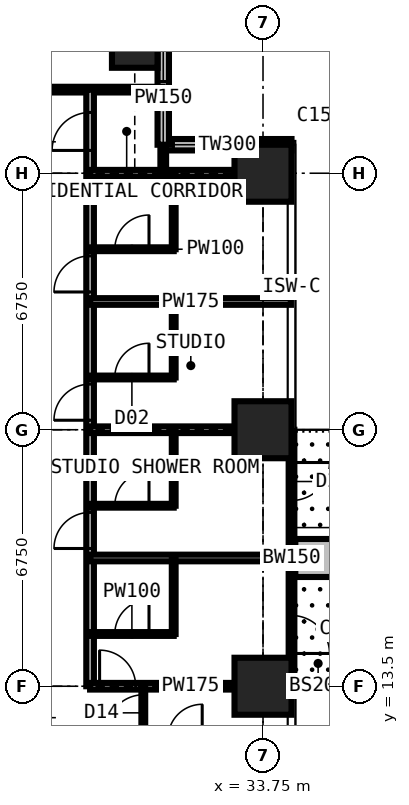
"""IFC4 building model, lengths in metres.
Left out: names, types, materials, properties, quantities, classifications, styles, units other than length and angle.
Written with IfcOpenShell. Run it as: python <this file> out.ifc"""

import sys

from ifc_helpers import new_model, si_unit, direction, frame, frame_2d, origin, origin_2d, place, context, subcontext, project, spatial, rectangle, extrude, element, fill, save


model = new_model("IFC4")
c1 = context("Model", 3, precision=1e-05, world=origin(), true_north=direction((0.0, 1.0)))
c2 = subcontext(c1, "Body", "Model", "MODEL_VIEW")
j1 = project(units=[si_unit("LENGTHUNIT", "METRE"), si_unit("PLANEANGLEUNIT", "RADIAN")], contexts=[c1])
p1 = place(None, origin())
s1 = spatial("IfcSite", under=j1, at=p1, CompositionType="ELEMENT")
p2 = place(p1, origin())
s2 = spatial("IfcBuilding", under=s1, at=p2, CompositionType="ELEMENT")
p3 = place(p2, frame((0.0, 0.0, 156.6)))
s3 = spatial("IfcBuildingStorey", under=s2, at=p3, CompositionType="ELEMENT", Elevation=156.6)
p4 = place(p3, frame((30.375, 30.375, 0.0), z_axis=(0.0, 0.0, 1.0), x_axis=(1.0, 0.0, 0.0)))
e1 = element("IfcColumn", 1, at=p4, inside=s3, PredefinedType="COLUMN", context=c2, shape_type="SweptSolid", body=[
    extrude(rectangle(XDim=1.2, YDim=1.2, at=origin_2d()), origin(), (0.0, 0.0, 1.0), 3.6),
])
for number, where, z_axis, x_axis in (
    (2, (33.75, 13.5, 0.0), (0.0, 0.0, 1.0), (1.0, 0.0, 0.0)),
    (3, (33.75, 20.25, 0.0), (0.0, 0.0, 1.0), (1.0, 0.0, 0.0)),
    (4, (33.75, 27.0, 0.0), (0.0, 0.0, 1.0), (1.0, 0.0, 0.0)),
):
    element("IfcColumn", number, at=place(p3, frame(where, z_axis=z_axis, x_axis=x_axis)), inside=s3, PredefinedType="COLUMN", context=c2, shape_type="SweptSolid", body=[
        extrude(rectangle(XDim=1.5, YDim=1.5, at=origin_2d()), origin(), (0.0, 0.0, 1.0), 3.6),
    ])
p5 = place(p3, frame((34.5, 20.25, 0.0), z_axis=(0.0, 0.0, 1.0), x_axis=(0.0, -1.0, 0.0)))
e5 = element("IfcWall", 5, at=p5, inside=s3, PredefinedType="SOLIDWALL", context=c2, shape_type="SweptSolid", body=[
    extrude(rectangle(XDim=6.75, YDim=0.15, at=frame_2d((3.375, 0.0))), origin(), (0.0, 0.0, 1.0), 3.375),
])
p6 = place(p5, frame((0.863, 0.0, 0.0)))
e6 = element("IfcOpeningElement", 6, at=p6, cuts=e5, PredefinedType="OPENING", context=c2, shape_type="SweptSolid", body=[
    extrude(rectangle(XDim=1.0, YDim=2.2, at=frame_2d((0.5, 1.1))), frame((0.0, 0.085, 0.0), z_axis=(0.0, -1.0, 0.0), x_axis=(1.0, 0.0, 0.0)), (0.0, 0.0, 1.0), 0.17),
])
p7 = place(p5, frame((1.975, 0.0, 0.9)))
e7 = element("IfcOpeningElement", 7, at=p7, cuts=e5, PredefinedType="OPENING", context=c2, shape_type="SweptSolid", body=[
    extrude(rectangle(XDim=1.2, YDim=1.8, at=frame_2d((0.6, 0.9))), frame((0.0, 0.085, 0.0), z_axis=(0.0, -1.0, 0.0), x_axis=(1.0, 0.0, 0.0)), (0.0, 0.0, 1.0), 0.17),
])
p8 = place(p5, frame((4.887, 0.0, 0.0)))
e8 = element("IfcOpeningElement", 8, at=p8, cuts=e5, PredefinedType="OPENING", context=c2, shape_type="SweptSolid", body=[
    extrude(rectangle(XDim=1.0, YDim=2.2, at=frame_2d((0.5, 1.1))), frame((0.0, 0.085, 0.0), z_axis=(0.0, -1.0, 0.0), x_axis=(1.0, 0.0, 0.0)), (0.0, 0.0, 1.0), 0.17),
])
p9 = place(p5, frame((3.575, 0.0, 0.9)))
e9 = element("IfcOpeningElement", 9, at=p9, cuts=e5, PredefinedType="OPENING", context=c2, shape_type="SweptSolid", body=[
    extrude(rectangle(XDim=1.2, YDim=1.8, at=frame_2d((0.6, 0.9))), frame((0.0, 0.085, 0.0), z_axis=(0.0, -1.0, 0.0), x_axis=(1.0, 0.0, 0.0)), (0.0, 0.0, 1.0), 0.17),
])
p10 = place(p3, frame((34.5, 27.75, 0.0), z_axis=(0.0, 0.0, 1.0), x_axis=(-1.0, 0.0, 0.0)))
e10 = element("IfcWall", 10, at=p10, inside=s3, PredefinedType="SOLIDWALL", context=c2, shape_type="SweptSolid", body=[
    extrude(rectangle(XDim=3.375, YDim=0.3, at=frame_2d((1.688, 0.0))), origin(), (0.0, 0.0, 1.0), 3.375),
])
p11 = place(p10, frame((1.607, 0.0, 0.9)))
e11 = element("IfcOpeningElement", 11, at=p11, cuts=e10, PredefinedType="OPENING", context=c2, shape_type="SweptSolid", body=[
    extrude(rectangle(XDim=1.5, YDim=1.8, at=frame_2d((0.75, 0.9))), frame((0.0, 0.16, 0.0), z_axis=(0.0, -1.0, 0.0), x_axis=(1.0, 0.0, 0.0)), (0.0, 0.0, 1.0), 0.32),
])
p12 = place(p3, frame((31.125, 27.75, 0.0), z_axis=(0.0, 0.0, 1.0), x_axis=(0.0, 1.0, 0.0)))
e12 = element("IfcWall", 12, at=p12, inside=s3, PredefinedType="SOLIDWALL", context=c2, shape_type="SweptSolid", body=[
    extrude(rectangle(XDim=3.375, YDim=0.3, at=frame_2d((1.688, 0.0))), origin(), (0.0, 0.0, 1.0), 3.375),
])
p13 = place(p12, frame((1.663, 0.0, 0.9)))
e13 = element("IfcOpeningElement", 13, at=p13, cuts=e12, PredefinedType="OPENING", context=c2, shape_type="SweptSolid", body=[
    extrude(rectangle(XDim=1.5, YDim=1.8, at=frame_2d((0.75, 0.9))), frame((0.0, 0.16, 0.0), z_axis=(0.0, -1.0, 0.0), x_axis=(1.0, 0.0, 0.0)), (0.0, 0.0, 1.0), 0.32),
])
p14 = place(p3, frame((34.6, 16.875, 0.0), z_axis=(0.0, 0.0, 1.0), x_axis=(1.0, 0.0, 0.0)))
e14 = element("IfcWall", 14, at=p14, inside=s3, PredefinedType="USERDEFINED", context=c2, shape_type="SweptSolid", body=[
    extrude(rectangle(XDim=2.2, YDim=1.0, at=frame_2d((1.1, 0.0))), origin(), (0.0, 0.0, 1.0), 0.9),
])
p15 = place(p3, frame((11.3, 29.2, 0.0), z_axis=(0.0, 0.0, 1.0), x_axis=(1.0, 0.0, 0.0)))
e15 = element("IfcWall", 15, at=p15, inside=s3, PredefinedType="PARTITIONING", context=c2, shape_type="SweptSolid", body=[
    extrude(rectangle(XDim=19.809, YDim=0.15, at=frame_2d((9.904, 0.0))), origin(), (0.0, 0.0, 1.0), 3.375),
])
p16 = place(p15, frame((14.625, 0.0, 0.0)))
e16 = element("IfcOpeningElement", 16, at=p16, cuts=e15, PredefinedType="OPENING", context=c2, shape_type="SweptSolid", body=[
    extrude(rectangle(XDim=1.0, YDim=2.2, at=frame_2d((0.5, 1.1))), frame((0.0, 0.085, 0.0), z_axis=(0.0, -1.0, 0.0), x_axis=(1.0, 0.0, 0.0)), (0.0, 0.0, 1.0), 0.17),
])
p17 = place(p15, frame((5.825, 0.0, 0.0)))
e17 = element("IfcOpeningElement", 17, at=p17, cuts=e15, PredefinedType="OPENING", context=c2, shape_type="SweptSolid", body=[
    extrude(rectangle(XDim=0.95, YDim=2.2, at=frame_2d((0.475, 1.1))), frame((0.0, 0.085, 0.0), z_axis=(0.0, -1.0, 0.0), x_axis=(1.0, 0.0, 0.0)), (0.0, 0.0, 1.0), 0.17),
])
p18 = place(p15, frame((9.2, 0.0, 0.0)))
e18 = element("IfcOpeningElement", 18, at=p18, cuts=e15, PredefinedType="OPENING", context=c2, shape_type="SweptSolid", body=[
    extrude(rectangle(XDim=0.95, YDim=2.2, at=frame_2d((0.475, 1.1))), frame((0.0, 0.085, 0.0), z_axis=(0.0, -1.0, 0.0), x_axis=(1.0, 0.0, 0.0)), (0.0, 0.0, 1.0), 0.17),
])
p19 = place(p15, frame((0.6, 0.0, 0.0)))
e19 = element("IfcOpeningElement", 19, at=p19, cuts=e15, PredefinedType="OPENING", context=c2, shape_type="SweptSolid", body=[
    extrude(rectangle(XDim=1.0, YDim=2.2, at=frame_2d((0.5, 1.1))), frame((0.0, 0.085, 0.0), z_axis=(0.0, -1.0, 0.0), x_axis=(1.0, 0.0, 0.0)), (0.0, 0.0, 1.0), 0.17),
])
p20 = place(p3, frame((29.2, 13.5, 0.0), z_axis=(0.0, 0.0, 1.0), x_axis=(0.0, 1.0, 0.0)))
e20 = element("IfcWall", 20, at=p20, inside=s3, PredefinedType="PARTITIONING", context=c2, shape_type="SweptSolid", body=[
    extrude(rectangle(XDim=15.7, YDim=0.2, at=frame_2d((7.85, 0.0))), origin(), (0.0, 0.0, 1.0), 3.375),
])
p21 = place(p20, frame((3.625, 0.0, 0.0)))
e21 = element("IfcOpeningElement", 21, at=p21, cuts=e20, PredefinedType="OPENING", context=c2, shape_type="SweptSolid", body=[
    extrude(rectangle(XDim=0.95, YDim=2.2, at=frame_2d((0.475, 1.1))), frame((0.0, 0.11, 0.0), z_axis=(0.0, -1.0, 0.0), x_axis=(1.0, 0.0, 0.0)), (0.0, 0.0, 1.0), 0.22),
])
p22 = place(p20, frame((7.0, 0.0, 0.0)))
e22 = element("IfcOpeningElement", 22, at=p22, cuts=e20, PredefinedType="OPENING", context=c2, shape_type="SweptSolid", body=[
    extrude(rectangle(XDim=0.95, YDim=2.2, at=frame_2d((0.475, 1.1))), frame((0.0, 0.11, 0.0), z_axis=(0.0, -1.0, 0.0), x_axis=(1.0, 0.0, 0.0)), (0.0, 0.0, 1.0), 0.22),
])
p23 = place(p20, frame((10.375, 0.0, 0.0)))
e23 = element("IfcOpeningElement", 23, at=p23, cuts=e20, PredefinedType="OPENING", context=c2, shape_type="SweptSolid", body=[
    extrude(rectangle(XDim=0.95, YDim=2.2, at=frame_2d((0.475, 1.1))), frame((0.0, 0.11, 0.0), z_axis=(0.0, -1.0, 0.0), x_axis=(1.0, 0.0, 0.0)), (0.0, 0.0, 1.0), 0.22),
])
p24 = place(p20, frame((14.1, 0.0, 0.0)))
e24 = element("IfcOpeningElement", 24, at=p24, cuts=e20, PredefinedType="OPENING", context=c2, shape_type="SweptSolid", body=[
    extrude(rectangle(XDim=1.0, YDim=2.2, at=frame_2d((0.5, 1.1))), frame((0.0, 0.11, 0.0), z_axis=(0.0, -1.0, 0.0), x_axis=(1.0, 0.0, 0.0)), (0.0, 0.0, 1.0), 0.22),
])
p25 = place(p3, frame((29.2, 13.5, 0.0), z_axis=(0.0, 0.0, 1.0), x_axis=(1.0, 0.0, 0.0)))
e25 = element("IfcWall", 25, at=p25, inside=s3, PredefinedType="PARTITIONING", context=c2, shape_type="SweptSolid", body=[
    extrude(rectangle(XDim=5.284, YDim=0.175, at=frame_2d((2.642, 0.0))), origin(), (0.0, 0.0, 1.0), 2.806),
])
p26 = place(p25, frame((0.25, 0.0, 0.0)))
e26 = element("IfcOpeningElement", 26, at=p26, cuts=e25, PredefinedType="OPENING", context=c2, shape_type="SweptSolid", body=[
    extrude(rectangle(XDim=0.95, YDim=2.2, at=frame_2d((0.475, 1.1))), frame((0.0, 0.097, 0.0), z_axis=(0.0, -1.0, 0.0), x_axis=(1.0, 0.0, 0.0)), (0.0, 0.0, 1.0), 0.195),
])
p27 = place(p3, frame((29.2, 14.875, 0.0), z_axis=(0.0, 0.0, 1.0), x_axis=(1.0, 0.0, 0.0)))
e27 = element("IfcWall", 27, at=p27, inside=s3, PredefinedType="PARTITIONING", context=c2, shape_type="SweptSolid", body=[
    extrude(rectangle(XDim=2.2, YDim=0.1, at=frame_2d((1.1, 0.0))), origin(), (0.0, 0.0, 1.0), 3.375),
])
p28 = place(p27, frame((0.65, 0.0, 0.0)))
e28 = element("IfcOpeningElement", 28, at=p28, cuts=e27, PredefinedType="OPENING", context=c2, shape_type="SweptSolid", body=[
    extrude(rectangle(XDim=0.9, YDim=2.2, at=frame_2d((0.45, 1.1))), frame((0.0, 0.06, 0.0), z_axis=(0.0, -1.0, 0.0), x_axis=(1.0, 0.0, 0.0)), (0.0, 0.0, 1.0), 0.12),
])
p29 = place(p3, frame((29.2, 16.875, 0.0), z_axis=(0.0, 0.0, 1.0), x_axis=(1.0, 0.0, 0.0)))
e29 = element("IfcWall", 29, at=p29, inside=s3, PredefinedType="PARTITIONING", context=c2, shape_type="SweptSolid", body=[
    extrude(rectangle(XDim=5.284, YDim=0.175, at=frame_2d((2.642, 0.0))), origin(), (0.0, 0.0, 1.0), 3.375),
])
p30 = place(p3, frame((29.2, 18.25, 0.0), z_axis=(0.0, 0.0, 1.0), x_axis=(1.0, 0.0, 0.0)))
e30 = element("IfcWall", 30, at=p30, inside=s3, PredefinedType="PARTITIONING", context=c2, shape_type="SweptSolid", body=[
    extrude(rectangle(XDim=2.2, YDim=0.1, at=frame_2d((1.1, 0.0))), origin(), (0.0, 0.0, 1.0), 3.375),
])
p31 = place(p30, frame((0.65, 0.0, 0.0)))
e31 = element("IfcOpeningElement", 31, at=p31, cuts=e30, PredefinedType="OPENING", context=c2, shape_type="SweptSolid", body=[
    extrude(rectangle(XDim=0.9, YDim=2.2, at=frame_2d((0.45, 1.1))), frame((0.0, 0.06, 0.0), z_axis=(0.0, -1.0, 0.0), x_axis=(1.0, 0.0, 0.0)), (0.0, 0.0, 1.0), 0.12),
])
p32 = place(p3, frame((29.2, 20.25, 0.0), z_axis=(0.0, 0.0, 1.0), x_axis=(1.0, 0.0, 0.0)))
e32 = element("IfcWall", 32, at=p32, inside=s3, PredefinedType="PARTITIONING", context=c2, shape_type="SweptSolid", body=[
    extrude(rectangle(XDim=5.284, YDim=0.175, at=frame_2d((2.642, 0.0))), origin(), (0.0, 0.0, 1.0), 2.806),
])
p33 = place(p3, frame((29.2, 21.625, 0.0), z_axis=(0.0, 0.0, 1.0), x_axis=(1.0, 0.0, 0.0)))
e33 = element("IfcWall", 33, at=p33, inside=s3, PredefinedType="PARTITIONING", context=c2, shape_type="SweptSolid", body=[
    extrude(rectangle(XDim=2.2, YDim=0.1, at=frame_2d((1.1, 0.0))), origin(), (0.0, 0.0, 1.0), 3.375),
])
p34 = place(p33, frame((0.65, 0.0, 0.0)))
e34 = element("IfcOpeningElement", 34, at=p34, cuts=e33, PredefinedType="OPENING", context=c2, shape_type="SweptSolid", body=[
    extrude(rectangle(XDim=0.9, YDim=2.2, at=frame_2d((0.45, 1.1))), frame((0.0, 0.06, 0.0), z_axis=(0.0, -1.0, 0.0), x_axis=(1.0, 0.0, 0.0)), (0.0, 0.0, 1.0), 0.12),
])
p35 = place(p3, frame((29.2, 23.625, 0.0), z_axis=(0.0, 0.0, 1.0), x_axis=(1.0, 0.0, 0.0)))
e35 = element("IfcWall", 35, at=p35, inside=s3, PredefinedType="PARTITIONING", context=c2, shape_type="SweptSolid", body=[
    extrude(rectangle(XDim=5.284, YDim=0.175, at=frame_2d((2.642, 0.0))), origin(), (0.0, 0.0, 1.0), 3.375),
])
p36 = place(p3, frame((29.2, 25.0, 0.0), z_axis=(0.0, 0.0, 1.0), x_axis=(1.0, 0.0, 0.0)))
e36 = element("IfcWall", 36, at=p36, inside=s3, PredefinedType="PARTITIONING", context=c2, shape_type="SweptSolid", body=[
    extrude(rectangle(XDim=2.2, YDim=0.1, at=frame_2d((1.1, 0.0))), origin(), (0.0, 0.0, 1.0), 3.375),
])
p37 = place(p36, frame((0.65, 0.0, 0.0)))
e37 = element("IfcOpeningElement", 37, at=p37, cuts=e36, PredefinedType="OPENING", context=c2, shape_type="SweptSolid", body=[
    extrude(rectangle(XDim=0.9, YDim=2.2, at=frame_2d((0.45, 1.1))), frame((0.0, 0.06, 0.0), z_axis=(0.0, -1.0, 0.0), x_axis=(1.0, 0.0, 0.0)), (0.0, 0.0, 1.0), 0.12),
])
p38 = place(p3, frame((29.2, 27.0, 0.0), z_axis=(0.0, 0.0, 1.0), x_axis=(1.0, 0.0, 0.0)))
e38 = element("IfcWall", 38, at=p38, inside=s3, PredefinedType="PARTITIONING", context=c2, shape_type="SweptSolid", body=[
    extrude(rectangle(XDim=5.284, YDim=0.175, at=frame_2d((2.642, 0.0))), origin(), (0.0, 0.0, 1.0), 2.806),
])
p39 = place(p3, frame((30.6, 10.125, 0.0), z_axis=(0.0, 0.0, 1.0), x_axis=(0.0, 1.0, 0.0)))
e39 = element("IfcWall", 39, at=p39, inside=s3, PredefinedType="PARTITIONING", context=c2, shape_type="SweptSolid", body=[
    extrude(rectangle(XDim=3.375, YDim=0.1, at=frame_2d((1.688, 0.0))), origin(), (0.0, 0.0, 1.0), 3.375),
])
p40 = place(p39, frame((2.2, 0.0, 0.0)))
e40 = element("IfcOpeningElement", 40, at=p40, cuts=e39, PredefinedType="OPENING", context=c2, shape_type="SweptSolid", body=[
    extrude(rectangle(XDim=0.95, YDim=2.2, at=frame_2d((0.475, 1.1))), frame((0.0, 0.06, 0.0), z_axis=(0.0, -1.0, 0.0), x_axis=(1.0, 0.0, 0.0)), (0.0, 0.0, 1.0), 0.12),
])
p41 = place(p3, frame((31.125, 27.0, 0.0), z_axis=(0.0, 0.0, 1.0), x_axis=(0.0, 1.0, 0.0)))
e41 = element("IfcWall", 41, at=p41, inside=s3, PredefinedType="PARTITIONING", context=c2, shape_type="SweptSolid", body=[
    extrude(rectangle(XDim=0.734, YDim=0.15, at=frame_2d((0.367, 0.0))), origin(), (0.0, 0.0, 1.0), 3.375),
])
for number, where, z_axis, x_axis in (
    (42, (31.4, 14.875, 0.0), (0.0, 0.0, 1.0), (0.0, 1.0, 0.0)),
    (43, (31.4, 18.25, 0.0), (0.0, 0.0, 1.0), (0.0, 1.0, 0.0)),
    (44, (31.4, 21.625, 0.0), (0.0, 0.0, 1.0), (0.0, 1.0, 0.0)),
    (45, (31.4, 25.0, 0.0), (0.0, 0.0, 1.0), (0.0, 1.0, 0.0)),
):
    element("IfcWall", number, at=place(p3, frame(where, z_axis=z_axis, x_axis=x_axis)), inside=s3, PredefinedType="PARTITIONING", context=c2, shape_type="SweptSolid", body=[
        extrude(rectangle(XDim=2.0, YDim=0.1, at=frame_2d((1.0, 0.0))), origin(), (0.0, 0.0, 1.0), 3.375),
    ])
p42 = place(p6, origin())
e46 = element("IfcDoor", 46, at=p42, inside=s3, OperationType="SINGLE_SWING_LEFT", PredefinedType="DOOR", context=c2, shape_type="SweptSolid", body=[
    extrude(rectangle(XDim=1.0, YDim=2.2, at=frame_2d((0.5, 1.1))), frame((0.0, 0.025, 0.0), z_axis=(0.0, -1.0, 0.0), x_axis=(1.0, 0.0, 0.0)), (0.0, 0.0, 1.0), 0.05),
])
fill(e6, e46)
p43 = place(p7, origin())
e47 = element("IfcWindow", 47, at=p43, inside=s3, PartitioningType="SINGLE_PANEL", PredefinedType="WINDOW", context=c2, shape_type="SweptSolid", body=[
    extrude(rectangle(XDim=1.2, YDim=1.8, at=frame_2d((0.6, 0.9))), frame((0.0, 0.03, 0.0), z_axis=(0.0, -1.0, 0.0), x_axis=(1.0, 0.0, 0.0)), (0.0, 0.0, 1.0), 0.06),
])
fill(e7, e47)
p44 = place(p8, origin())
e48 = element("IfcDoor", 48, at=p44, inside=s3, OperationType="SINGLE_SWING_RIGHT", PredefinedType="DOOR", context=c2, shape_type="SweptSolid", body=[
    extrude(rectangle(XDim=1.0, YDim=2.2, at=frame_2d((0.5, 1.1))), frame((0.0, 0.025, 0.0), z_axis=(0.0, -1.0, 0.0), x_axis=(1.0, 0.0, 0.0)), (0.0, 0.0, 1.0), 0.05),
])
fill(e8, e48)
p45 = place(p9, origin())
e49 = element("IfcWindow", 49, at=p45, inside=s3, PartitioningType="SINGLE_PANEL", PredefinedType="WINDOW", context=c2, shape_type="SweptSolid", body=[
    extrude(rectangle(XDim=1.2, YDim=1.8, at=frame_2d((0.6, 0.9))), frame((0.0, 0.03, 0.0), z_axis=(0.0, -1.0, 0.0), x_axis=(1.0, 0.0, 0.0)), (0.0, 0.0, 1.0), 0.06),
])
fill(e9, e49)
p46 = place(p11, origin())
e50 = element("IfcWindow", 50, at=p46, inside=s3, PartitioningType="SINGLE_PANEL", PredefinedType="WINDOW", context=c2, shape_type="SweptSolid", body=[
    extrude(rectangle(XDim=1.5, YDim=1.8, at=frame_2d((0.75, 0.9))), frame((0.0, 0.03, 0.0), z_axis=(0.0, -1.0, 0.0), x_axis=(1.0, 0.0, 0.0)), (0.0, 0.0, 1.0), 0.06),
])
fill(e11, e50)
p47 = place(p13, origin())
e51 = element("IfcWindow", 51, at=p47, inside=s3, PartitioningType="SINGLE_PANEL", PredefinedType="WINDOW", context=c2, shape_type="SweptSolid", body=[
    extrude(rectangle(XDim=1.5, YDim=1.8, at=frame_2d((0.75, 0.9))), frame((0.0, 0.03, 0.0), z_axis=(0.0, -1.0, 0.0), x_axis=(1.0, 0.0, 0.0)), (0.0, 0.0, 1.0), 0.06),
])
fill(e13, e51)
p48 = place(p40, origin())
e52 = element("IfcDoor", 52, at=p48, inside=s3, OperationType="SINGLE_SWING_LEFT", PredefinedType="DOOR", context=c2, shape_type="SweptSolid", body=[
    extrude(rectangle(XDim=0.95, YDim=2.2, at=frame_2d((0.475, 1.1))), frame((0.0, 0.025, 0.0), z_axis=(0.0, -1.0, 0.0), x_axis=(1.0, 0.0, 0.0)), (0.0, 0.0, 1.0), 0.05),
])
fill(e40, e52)
p49 = place(p26, origin())
e53 = element("IfcDoor", 53, at=p49, inside=s3, OperationType="SINGLE_SWING_LEFT", PredefinedType="DOOR", context=c2, shape_type="SweptSolid", body=[
    extrude(rectangle(XDim=0.95, YDim=2.2, at=frame_2d((0.475, 1.1))), frame((0.0, 0.025, 0.0), z_axis=(0.0, -1.0, 0.0), x_axis=(1.0, 0.0, 0.0)), (0.0, 0.0, 1.0), 0.05),
])
fill(e26, e53)
p50 = place(p28, origin())
e54 = element("IfcDoor", 54, at=p50, inside=s3, OperationType="SINGLE_SWING_RIGHT", PredefinedType="DOOR", context=c2, shape_type="SweptSolid", body=[
    extrude(rectangle(XDim=0.9, YDim=2.2, at=frame_2d((0.45, 1.1))), frame((0.0, 0.025, 0.0), z_axis=(0.0, -1.0, 0.0), x_axis=(1.0, 0.0, 0.0)), (0.0, 0.0, 1.0), 0.05),
])
fill(e28, e54)
p51 = place(p21, origin())
e55 = element("IfcDoor", 55, at=p51, inside=s3, OperationType="SINGLE_SWING_LEFT", PredefinedType="DOOR", context=c2, shape_type="SweptSolid", body=[
    extrude(rectangle(XDim=0.95, YDim=2.2, at=frame_2d((0.475, 1.1))), frame((0.0, 0.025, 0.0), z_axis=(0.0, -1.0, 0.0), x_axis=(1.0, 0.0, 0.0)), (0.0, 0.0, 1.0), 0.05),
])
fill(e21, e55)
p52 = place(p31, origin())
e56 = element("IfcDoor", 56, at=p52, inside=s3, OperationType="SINGLE_SWING_RIGHT", PredefinedType="DOOR", context=c2, shape_type="SweptSolid", body=[
    extrude(rectangle(XDim=0.9, YDim=2.2, at=frame_2d((0.45, 1.1))), frame((0.0, 0.025, 0.0), z_axis=(0.0, -1.0, 0.0), x_axis=(1.0, 0.0, 0.0)), (0.0, 0.0, 1.0), 0.05),
])
fill(e31, e56)
p53 = place(p22, origin())
e57 = element("IfcDoor", 57, at=p53, inside=s3, OperationType="SINGLE_SWING_LEFT", PredefinedType="DOOR", context=c2, shape_type="SweptSolid", body=[
    extrude(rectangle(XDim=0.95, YDim=2.2, at=frame_2d((0.475, 1.1))), frame((0.0, 0.025, 0.0), z_axis=(0.0, -1.0, 0.0), x_axis=(1.0, 0.0, 0.0)), (0.0, 0.0, 1.0), 0.05),
])
fill(e22, e57)
p54 = place(p34, origin())
e58 = element("IfcDoor", 58, at=p54, inside=s3, OperationType="SINGLE_SWING_RIGHT", PredefinedType="DOOR", context=c2, shape_type="SweptSolid", body=[
    extrude(rectangle(XDim=0.9, YDim=2.2, at=frame_2d((0.45, 1.1))), frame((0.0, 0.025, 0.0), z_axis=(0.0, -1.0, 0.0), x_axis=(1.0, 0.0, 0.0)), (0.0, 0.0, 1.0), 0.05),
])
fill(e34, e58)
p55 = place(p23, origin())
e59 = element("IfcDoor", 59, at=p55, inside=s3, OperationType="SINGLE_SWING_LEFT", PredefinedType="DOOR", context=c2, shape_type="SweptSolid", body=[
    extrude(rectangle(XDim=0.95, YDim=2.2, at=frame_2d((0.475, 1.1))), frame((0.0, 0.025, 0.0), z_axis=(0.0, -1.0, 0.0), x_axis=(1.0, 0.0, 0.0)), (0.0, 0.0, 1.0), 0.05),
])
fill(e23, e59)
p56 = place(p37, origin())
e60 = element("IfcDoor", 60, at=p56, inside=s3, OperationType="SINGLE_SWING_RIGHT", PredefinedType="DOOR", context=c2, shape_type="SweptSolid", body=[
    extrude(rectangle(XDim=0.9, YDim=2.2, at=frame_2d((0.45, 1.1))), frame((0.0, 0.025, 0.0), z_axis=(0.0, -1.0, 0.0), x_axis=(1.0, 0.0, 0.0)), (0.0, 0.0, 1.0), 0.05),
])
fill(e37, e60)
p57 = place(p24, origin())
e61 = element("IfcDoor", 61, at=p57, inside=s3, OperationType="SINGLE_SWING_LEFT", PredefinedType="DOOR", context=c2, shape_type="SweptSolid", body=[
    extrude(rectangle(XDim=1.0, YDim=2.2, at=frame_2d((0.5, 1.1))), frame((0.0, 0.025, 0.0), z_axis=(0.0, -1.0, 0.0), x_axis=(1.0, 0.0, 0.0)), (0.0, 0.0, 1.0), 0.05),
])
fill(e24, e61)
save(model, sys.argv[1])
